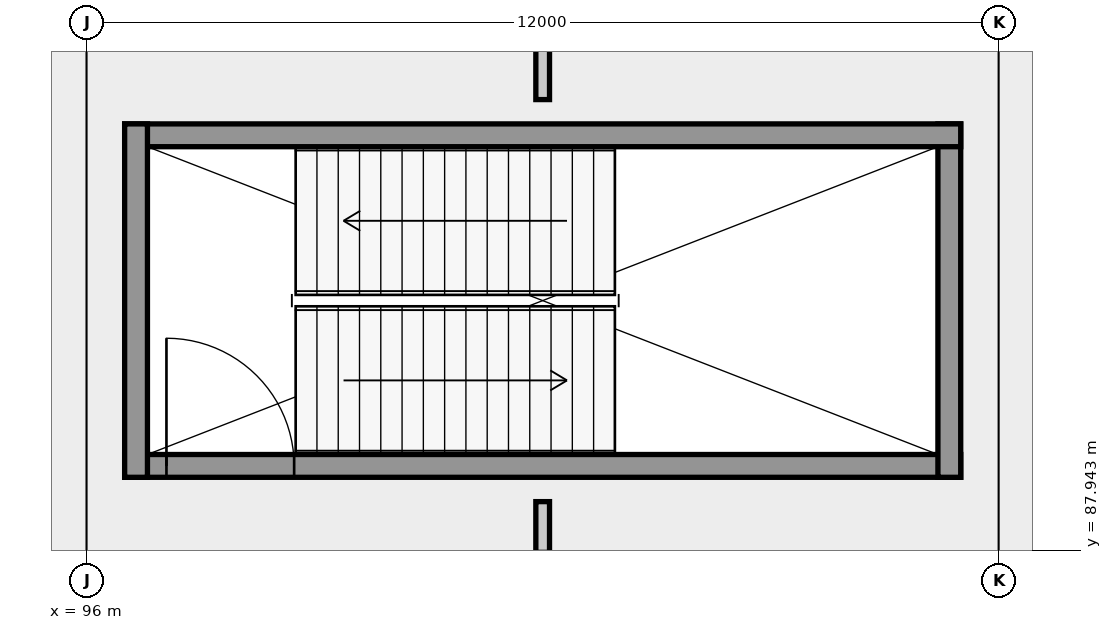
"""IFC4 building model, lengths in metres.
Left out: names, types, materials, properties, quantities, classifications, styles, units other than length and angle.
Written with IfcOpenShell. Run it as: python <this file> out.ifc"""

import sys

from ifc_helpers import new_model, si_unit, direction, frame, frame_2d, origin, place, context, subcontext, project, spatial, rectangle, extrude, element, fill, save


model = new_model("IFC4")
c1 = context("Model", 3, precision=1e-05, world=origin(), true_north=direction((0.0, 1.0)))
c2 = subcontext(c1, "Body", "Model", "MODEL_VIEW")
j1 = project(units=[si_unit("LENGTHUNIT", "METRE"), si_unit("PLANEANGLEUNIT", "RADIAN")], contexts=[c1])
p1 = place(None, origin())
s1 = spatial("IfcSite", under=j1, at=p1, CompositionType="ELEMENT")
p2 = place(p1, origin())
s2 = spatial("IfcBuilding", under=s1, at=p2, CompositionType="ELEMENT")
p3 = place(p2, frame((0.0, 0.0, 10.8)))
s3 = spatial("IfcBuildingStorey", under=s2, at=p3, CompositionType="ELEMENT", Elevation=10.8)
p4 = place(p3, frame((96.5, 89.05, 0.0), z_axis=(0.0, 0.0, 1.0), x_axis=(1.0, 0.0, 0.0)))
e1 = element("IfcWall", 1, at=p4, inside=s3, PredefinedType="SHEAR", context=c2, shape_type="SweptSolid", body=[
    extrude(rectangle(XDim=11.0, YDim=0.3, at=frame_2d((5.5, 0.0))), origin(), (0.0, 0.0, 1.0), 5.69),
])
p5 = place(p4, frame((0.55, 0.0, 0.0)))
e2 = element("IfcOpeningElement", 2, at=p5, cuts=e1, PredefinedType="OPENING", context=c2, shape_type="SweptSolid", body=[
    extrude(rectangle(XDim=1.68, YDim=2.35, at=frame_2d((0.84, 1.175))), frame((0.0, 0.16, 0.0), z_axis=(0.0, -1.0, 0.0), x_axis=(1.0, 0.0, 0.0)), (0.0, 0.0, 1.0), 0.32),
])
p6 = place(p3, frame((107.35, 88.9, 0.0), z_axis=(0.0, 0.0, 1.0), x_axis=(0.0, 1.0, 0.0)))
e3 = element("IfcWall", 3, at=p6, inside=s3, PredefinedType="SHEAR", context=c2, shape_type="SweptSolid", body=[
    extrude(rectangle(XDim=4.65, YDim=0.3, at=frame_2d((2.325, 0.0))), origin(), (0.0, 0.0, 1.0), 5.69),
])
p7 = place(p3, frame((107.5, 93.4, 0.0), z_axis=(0.0, 0.0, 1.0), x_axis=(-1.0, 0.0, 0.0)))
e4 = element("IfcWall", 4, at=p7, inside=s3, PredefinedType="SHEAR", context=c2, shape_type="SweptSolid", body=[
    extrude(rectangle(XDim=11.0, YDim=0.3, at=frame_2d((5.5, 0.0))), origin(), (0.0, 0.0, 1.0), 5.69),
])
p8 = place(p3, frame((96.65, 93.55, 0.0), z_axis=(0.0, 0.0, 1.0), x_axis=(0.0, -1.0, 0.0)))
e5 = element("IfcWall", 5, at=p8, inside=s3, PredefinedType="SHEAR", context=c2, shape_type="SweptSolid", body=[
    extrude(rectangle(XDim=4.65, YDim=0.3, at=frame_2d((2.325, 0.0))), origin(), (0.0, 0.0, 1.0), 5.69),
])
p9 = place(p3, frame((102.0, 84.38, 0.0), z_axis=(0.0, 0.0, 1.0), x_axis=(0.0, 1.0, 0.0)))
e6 = element("IfcWall", 6, at=p9, inside=s3, PredefinedType="PARTITIONING", context=c2, shape_type="SweptSolid", body=[
    extrude(rectangle(XDim=4.2, YDim=0.18, at=frame_2d((2.1, 0.0))), origin(), (0.0, 0.0, 1.0), 5.67),
])
p10 = place(p9, frame((1.25, 0.0, 0.0)))
e7 = element("IfcOpeningElement", 7, at=p10, cuts=e6, PredefinedType="OPENING", context=c2, shape_type="SweptSolid", body=[
    extrude(rectangle(XDim=2.3, YDim=2.6, at=frame_2d((1.15, 1.3))), frame((0.0, 0.1, 0.0), z_axis=(0.0, -1.0, 0.0), x_axis=(1.0, 0.0, 0.0)), (0.0, 0.0, 1.0), 0.2),
])
p11 = place(p3, frame((102.0, 93.87, 0.0), z_axis=(0.0, 0.0, 1.0), x_axis=(0.0, 1.0, 0.0)))
e8 = element("IfcWall", 8, at=p11, inside=s3, PredefinedType="PARTITIONING", context=c2, shape_type="SweptSolid", body=[
    extrude(rectangle(XDim=25.75, YDim=0.18, at=frame_2d((12.875, 0.0))), origin(), (0.0, 0.0, 1.0), 5.18),
])
p12 = place(p5, origin())
e9 = element("IfcDoor", 9, at=p12, inside=s3, OperationType="DOUBLE_DOOR_SINGLE_SWING", PredefinedType="DOOR", context=c2, shape_type="SweptSolid", body=[
    extrude(rectangle(XDim=1.68, YDim=2.35, at=frame_2d((0.84, 1.175))), frame((0.0, 0.025, 0.0), z_axis=(0.0, -1.0, 0.0), x_axis=(1.0, 0.0, 0.0)), (0.0, 0.0, 1.0), 0.05),
])
fill(e2, e9)
save(model, sys.argv[1])
